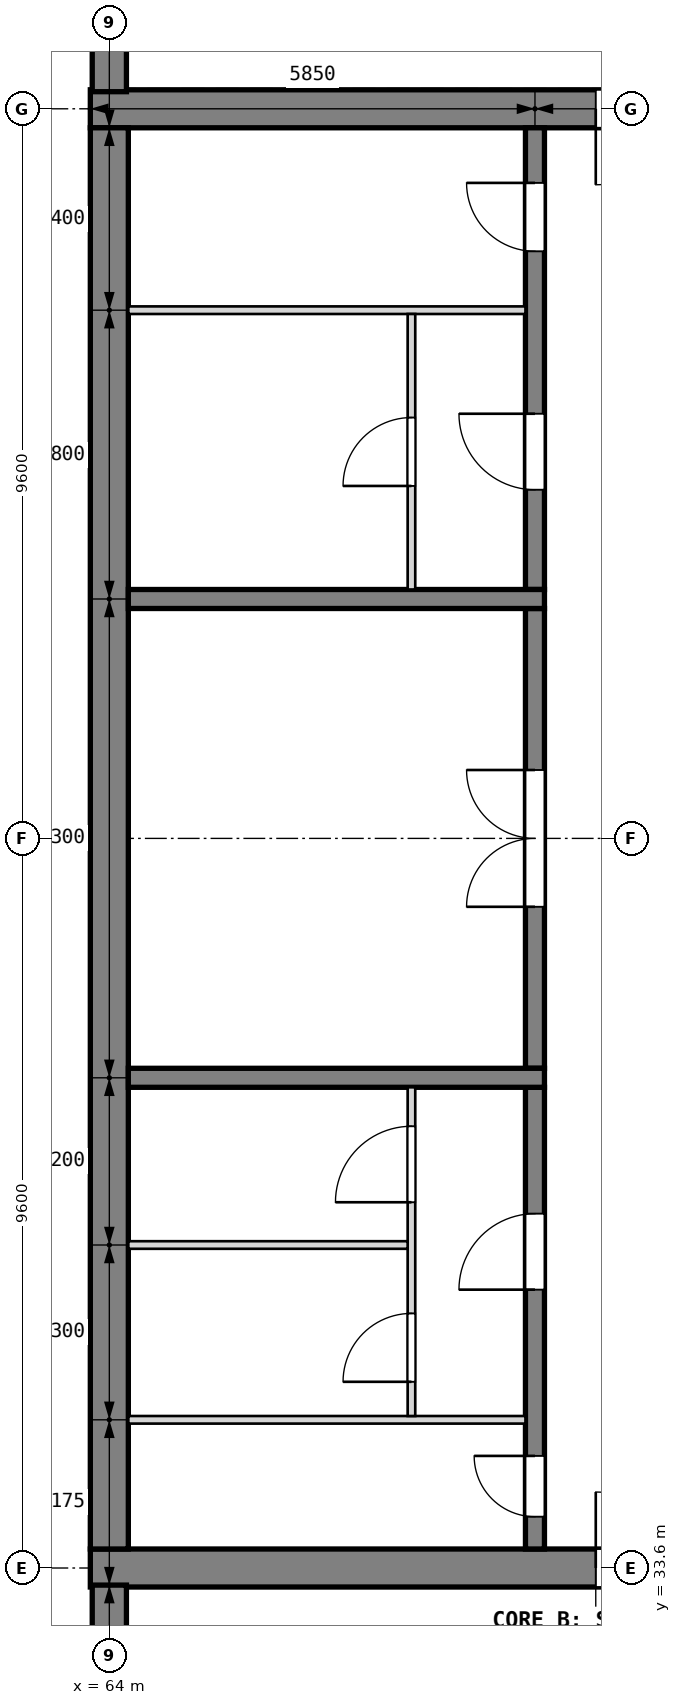
"""IFC4 building model, lengths in metres.
Left out: names, types, materials, properties, quantities, classifications, styles, units other than length and angle.
Written with IfcOpenShell. Run it as: python <this file> out.ifc"""

import sys

from ifc_helpers import new_model, si_unit, direction, frame, frame_2d, origin, place, context, subcontext, project, spatial, rectangle, extrude, element, fill, save


model = new_model("IFC4")
c1 = context("Model", 3, precision=1e-05, world=origin(), true_north=direction((0.0, 1.0)))
c2 = subcontext(c1, "Body", "Model", "MODEL_VIEW")
j1 = project(units=[si_unit("LENGTHUNIT", "METRE"), si_unit("PLANEANGLEUNIT", "RADIAN")], contexts=[c1])
p1 = place(None, origin())
s1 = spatial("IfcSite", under=j1, at=p1, CompositionType="ELEMENT")
p2 = place(p1, origin())
s2 = spatial("IfcBuilding", under=s1, at=p2, CompositionType="ELEMENT")
p3 = place(p2, frame((0.0, 0.0, -4.8)))
s3 = spatial("IfcBuildingStorey", under=s2, at=p3, CompositionType="ELEMENT", Elevation=-4.8)
p4 = place(p3, frame((63.75, 52.8, 0.0), z_axis=(0.0, 0.0, 1.0), x_axis=(1.0, 0.0, 0.0)))
e1 = element("IfcWall", 1, at=p4, inside=s3, PredefinedType="SHEAR", context=c2, shape_type="SweptSolid", body=[
    extrude(rectangle(XDim=13.3, YDim=0.5, at=frame_2d((6.65, 0.0))), origin(), (0.0, 0.0, 1.0), 4.8),
])
p5 = place(p4, frame((6.65, 0.0, 0.0)))
e2 = element("IfcOpeningElement", 2, at=p5, cuts=e1, PredefinedType="OPENING", context=c2, shape_type="SweptSolid", body=[
    extrude(rectangle(XDim=2.0, YDim=2.1, at=frame_2d((1.0, 1.05))), frame((0.0, 0.26, 0.0), z_axis=(0.0, -1.0, 0.0), x_axis=(1.0, 0.0, 0.0)), (0.0, 0.0, 1.0), 0.52),
])
p6 = place(p3, frame((63.75, 33.6, 0.0), z_axis=(0.0, 0.0, 1.0), x_axis=(1.0, 0.0, 0.0)))
e3 = element("IfcWall", 3, at=p6, inside=s3, PredefinedType="SHEAR", context=c2, shape_type="SweptSolid", body=[
    extrude(rectangle(XDim=13.3, YDim=0.5, at=frame_2d((6.65, 0.0))), origin(), (0.0, 0.0, 1.0), 4.8),
])
p7 = place(p6, frame((6.65, 0.0, 0.0)))
e4 = element("IfcOpeningElement", 4, at=p7, cuts=e3, PredefinedType="OPENING", context=c2, shape_type="SweptSolid", body=[
    extrude(rectangle(XDim=2.0, YDim=2.1, at=frame_2d((1.0, 1.05))), frame((0.0, 0.26, 0.0), z_axis=(0.0, -1.0, 0.0), x_axis=(1.0, 0.0, 0.0)), (0.0, 0.0, 1.0), 0.52),
])
p8 = place(p3, frame((64.0, 33.85, 0.0), z_axis=(0.0, 0.0, 1.0), x_axis=(0.0, 1.0, 0.0)))
e5 = element("IfcWall", 5, at=p8, inside=s3, PredefinedType="SHEAR", context=c2, shape_type="SweptSolid", body=[
    extrude(rectangle(XDim=18.7, YDim=0.5, at=frame_2d((9.35, 0.0))), origin(), (0.0, 0.0, 1.0), 4.8),
])
p9 = place(p3, frame((64.0, -0.225, 0.0), z_axis=(0.0, 0.0, 1.0), x_axis=(0.0, 1.0, 0.0)))
e6 = element("IfcWall", 6, at=p9, inside=s3, PredefinedType="SOLIDWALL", context=c2, shape_type="SweptSolid", body=[
    extrude(rectangle(XDim=33.6, YDim=0.45, at=frame_2d((16.8, 0.0))), origin(), (0.0, 0.0, 1.0), 4.8),
])
p10 = place(p3, frame((64.0, 53.025, 0.0), z_axis=(0.0, 0.0, 1.0), x_axis=(0.0, 1.0, 0.0)))
e7 = element("IfcWall", 7, at=p10, inside=s3, PredefinedType="SOLIDWALL", context=c2, shape_type="SweptSolid", body=[
    extrude(rectangle(XDim=4.8, YDim=0.45, at=frame_2d((2.4, 0.0))), origin(), (0.0, 0.0, 1.0), 4.8),
])
p11 = place(p3, frame((69.6, 33.85, 0.0), z_axis=(0.0, 0.0, 1.0), x_axis=(0.0, 1.0, 0.0)))
e8 = element("IfcWall", 8, at=p11, inside=s3, PredefinedType="SOLIDWALL", context=c2, shape_type="SweptSolid", body=[
    extrude(rectangle(XDim=6.075, YDim=0.25, at=frame_2d((3.038, 0.0))), origin(), (0.0, 0.0, 1.0), 4.5),
])
p12 = place(p11, frame((0.425, 0.0, 0.0)))
e9 = element("IfcOpeningElement", 9, at=p12, cuts=e8, PredefinedType="OPENING", context=c2, shape_type="SweptSolid", body=[
    extrude(rectangle(XDim=0.8, YDim=2.1, at=frame_2d((0.4, 1.05))), frame((0.0, 0.135, 0.0), z_axis=(0.0, -1.0, 0.0), x_axis=(1.0, 0.0, 0.0)), (0.0, 0.0, 1.0), 0.27),
])
p13 = place(p11, frame((3.413, 0.0, 0.0)))
e10 = element("IfcOpeningElement", 10, at=p13, cuts=e8, PredefinedType="OPENING", context=c2, shape_type="SweptSolid", body=[
    extrude(rectangle(XDim=1.0, YDim=2.1, at=frame_2d((0.5, 1.05))), frame((0.0, 0.135, 0.0), z_axis=(0.0, -1.0, 0.0), x_axis=(1.0, 0.0, 0.0)), (0.0, 0.0, 1.0), 0.27),
])
p14 = place(p3, frame((69.6, 40.175, 0.0), z_axis=(0.0, 0.0, 1.0), x_axis=(0.0, 1.0, 0.0)))
e11 = element("IfcWall", 11, at=p14, inside=s3, PredefinedType="SOLIDWALL", context=c2, shape_type="SweptSolid", body=[
    extrude(rectangle(XDim=6.05, YDim=0.25, at=frame_2d((3.025, 0.0))), origin(), (0.0, 0.0, 1.0), 4.5),
])
p15 = place(p14, frame((2.125, 0.0, 0.0)))
e12 = element("IfcOpeningElement", 12, at=p15, cuts=e11, PredefinedType="OPENING", context=c2, shape_type="SweptSolid", body=[
    extrude(rectangle(XDim=1.8, YDim=2.1, at=frame_2d((0.9, 1.05))), frame((0.0, 0.135, 0.0), z_axis=(0.0, -1.0, 0.0), x_axis=(1.0, 0.0, 0.0)), (0.0, 0.0, 1.0), 0.27),
])
p16 = place(p3, frame((69.6, 46.475, 0.0), z_axis=(0.0, 0.0, 1.0), x_axis=(0.0, 1.0, 0.0)))
e13 = element("IfcWall", 13, at=p16, inside=s3, PredefinedType="SOLIDWALL", context=c2, shape_type="SweptSolid", body=[
    extrude(rectangle(XDim=6.075, YDim=0.25, at=frame_2d((3.038, 0.0))), origin(), (0.0, 0.0, 1.0), 4.5),
])
p17 = place(p16, frame((1.312, 0.0, 0.0)))
e14 = element("IfcOpeningElement", 14, at=p17, cuts=e13, PredefinedType="OPENING", context=c2, shape_type="SweptSolid", body=[
    extrude(rectangle(XDim=1.0, YDim=2.1, at=frame_2d((0.5, 1.05))), frame((0.0, 0.135, 0.0), z_axis=(0.0, -1.0, 0.0), x_axis=(1.0, 0.0, 0.0)), (0.0, 0.0, 1.0), 0.27),
])
p18 = place(p16, frame((4.45, 0.0, 0.0)))
e15 = element("IfcOpeningElement", 15, at=p18, cuts=e13, PredefinedType="OPENING", context=c2, shape_type="SweptSolid", body=[
    extrude(rectangle(XDim=0.9, YDim=2.1, at=frame_2d((0.45, 1.05))), frame((0.0, 0.135, 0.0), z_axis=(0.0, -1.0, 0.0), x_axis=(1.0, 0.0, 0.0)), (0.0, 0.0, 1.0), 0.27),
])
for number, where, z_axis, x_axis in (
    (16, (69.725, 40.05, 0.0), (0.0, 0.0, 1.0), (-1.0, 0.0, 0.0)),
    (17, (69.725, 46.35, 0.0), (0.0, 0.0, 1.0), (-1.0, 0.0, 0.0)),
):
    element("IfcWall", number, at=place(p3, frame(where, z_axis=z_axis, x_axis=x_axis)), inside=s3, PredefinedType="SOLIDWALL", context=c2, shape_type="SweptSolid", body=[
        extrude(rectangle(XDim=5.475, YDim=0.25, at=frame_2d((2.738, 0.0))), origin(), (0.0, 0.0, 1.0), 4.5),
    ])
p19 = place(p3, frame((69.475, 35.55, 0.0), z_axis=(0.0, 0.0, 1.0), x_axis=(-1.0, 0.0, 0.0)))
e18 = element("IfcWall", 18, at=p19, inside=s3, PredefinedType="PARTITIONING", context=c2, shape_type="SweptSolid", body=[
    extrude(rectangle(XDim=5.225, YDim=0.1, at=frame_2d((2.613, 0.0))), origin(), (0.0, 0.0, 1.0), 4.5),
])
p20 = place(p3, frame((67.975, 35.6, 0.0), z_axis=(0.0, 0.0, 1.0), x_axis=(0.0, 1.0, 0.0)))
e19 = element("IfcWall", 19, at=p20, inside=s3, PredefinedType="PARTITIONING", context=c2, shape_type="SweptSolid", body=[
    extrude(rectangle(XDim=4.325, YDim=0.1, at=frame_2d((2.163, 0.0))), origin(), (0.0, 0.0, 1.0), 4.5),
])
p21 = place(p20, frame((0.45, 0.0, 0.0)))
e20 = element("IfcOpeningElement", 20, at=p21, cuts=e19, PredefinedType="OPENING", context=c2, shape_type="SweptSolid", body=[
    extrude(rectangle(XDim=0.9, YDim=2.1, at=frame_2d((0.45, 1.05))), frame((0.0, 0.06, 0.0), z_axis=(0.0, -1.0, 0.0), x_axis=(1.0, 0.0, 0.0)), (0.0, 0.0, 1.0), 0.12),
])
p22 = place(p20, frame((2.812, 0.0, 0.0)))
e21 = element("IfcOpeningElement", 21, at=p22, cuts=e19, PredefinedType="OPENING", context=c2, shape_type="SweptSolid", body=[
    extrude(rectangle(XDim=1.0, YDim=2.1, at=frame_2d((0.5, 1.05))), frame((0.0, 0.06, 0.0), z_axis=(0.0, -1.0, 0.0), x_axis=(1.0, 0.0, 0.0)), (0.0, 0.0, 1.0), 0.12),
])
p23 = place(p3, frame((67.925, 37.85, 0.0), z_axis=(0.0, 0.0, 1.0), x_axis=(-1.0, 0.0, 0.0)))
e22 = element("IfcWall", 22, at=p23, inside=s3, PredefinedType="PARTITIONING", context=c2, shape_type="SweptSolid", body=[
    extrude(rectangle(XDim=3.675, YDim=0.1, at=frame_2d((1.837, 0.0))), origin(), (0.0, 0.0, 1.0), 4.5),
])
p24 = place(p3, frame((69.475, 50.15, 0.0), z_axis=(0.0, 0.0, 1.0), x_axis=(-1.0, 0.0, 0.0)))
e23 = element("IfcWall", 23, at=p24, inside=s3, PredefinedType="PARTITIONING", context=c2, shape_type="SweptSolid", body=[
    extrude(rectangle(XDim=5.225, YDim=0.1, at=frame_2d((2.613, 0.0))), origin(), (0.0, 0.0, 1.0), 4.5),
])
p25 = place(p3, frame((67.975, 46.475, 0.0), z_axis=(0.0, 0.0, 1.0), x_axis=(0.0, 1.0, 0.0)))
e24 = element("IfcWall", 24, at=p25, inside=s3, PredefinedType="PARTITIONING", context=c2, shape_type="SweptSolid", body=[
    extrude(rectangle(XDim=3.625, YDim=0.1, at=frame_2d((1.812, 0.0))), origin(), (0.0, 0.0, 1.0), 4.5),
])
p26 = place(p25, frame((1.363, 0.0, 0.0)))
e25 = element("IfcOpeningElement", 25, at=p26, cuts=e24, PredefinedType="OPENING", context=c2, shape_type="SweptSolid", body=[
    extrude(rectangle(XDim=0.9, YDim=2.1, at=frame_2d((0.45, 1.05))), frame((0.0, 0.06, 0.0), z_axis=(0.0, -1.0, 0.0), x_axis=(1.0, 0.0, 0.0)), (0.0, 0.0, 1.0), 0.12),
])
p27 = place(p15, origin())
e26 = element("IfcDoor", 26, at=p27, inside=s3, OperationType="DOUBLE_DOOR_SINGLE_SWING", PredefinedType="DOOR", context=c2, shape_type="SweptSolid", body=[
    extrude(rectangle(XDim=1.8, YDim=2.1, at=frame_2d((0.9, 1.05))), frame((0.0, 0.025, 0.0), z_axis=(0.0, -1.0, 0.0), x_axis=(1.0, 0.0, 0.0)), (0.0, 0.0, 1.0), 0.05),
])
fill(e12, e26)
p28 = place(p12, origin())
e27 = element("IfcDoor", 27, at=p28, inside=s3, OperationType="SINGLE_SWING_RIGHT", PredefinedType="DOOR", context=c2, shape_type="SweptSolid", body=[
    extrude(rectangle(XDim=0.8, YDim=2.1, at=frame_2d((0.4, 1.05))), frame((0.0, 0.025, 0.0), z_axis=(0.0, -1.0, 0.0), x_axis=(1.0, 0.0, 0.0)), (0.0, 0.0, 1.0), 0.05),
])
fill(e9, e27)
p29 = place(p13, origin())
e28 = element("IfcDoor", 28, at=p29, inside=s3, OperationType="SINGLE_SWING_LEFT", PredefinedType="DOOR", context=c2, shape_type="SweptSolid", body=[
    extrude(rectangle(XDim=1.0, YDim=2.1, at=frame_2d((0.5, 1.05))), frame((0.0, 0.025, 0.0), z_axis=(0.0, -1.0, 0.0), x_axis=(1.0, 0.0, 0.0)), (0.0, 0.0, 1.0), 0.05),
])
fill(e10, e28)
p30 = place(p21, origin())
e29 = element("IfcDoor", 29, at=p30, inside=s3, OperationType="SINGLE_SWING_LEFT", PredefinedType="DOOR", context=c2, shape_type="SweptSolid", body=[
    extrude(rectangle(XDim=0.9, YDim=2.1, at=frame_2d((0.45, 1.05))), frame((0.0, 0.025, 0.0), z_axis=(0.0, -1.0, 0.0), x_axis=(1.0, 0.0, 0.0)), (0.0, 0.0, 1.0), 0.05),
])
fill(e20, e29)
p31 = place(p22, origin())
e30 = element("IfcDoor", 30, at=p31, inside=s3, OperationType="SINGLE_SWING_LEFT", PredefinedType="DOOR", context=c2, shape_type="SweptSolid", body=[
    extrude(rectangle(XDim=1.0, YDim=2.1, at=frame_2d((0.5, 1.05))), frame((0.0, 0.025, 0.0), z_axis=(0.0, -1.0, 0.0), x_axis=(1.0, 0.0, 0.0)), (0.0, 0.0, 1.0), 0.05),
])
fill(e21, e30)
p32 = place(p17, origin())
e31 = element("IfcDoor", 31, at=p32, inside=s3, OperationType="SINGLE_SWING_RIGHT", PredefinedType="DOOR", context=c2, shape_type="SweptSolid", body=[
    extrude(rectangle(XDim=1.0, YDim=2.1, at=frame_2d((0.5, 1.05))), frame((0.0, 0.025, 0.0), z_axis=(0.0, -1.0, 0.0), x_axis=(1.0, 0.0, 0.0)), (0.0, 0.0, 1.0), 0.05),
])
fill(e14, e31)
p33 = place(p26, origin())
e32 = element("IfcDoor", 32, at=p33, inside=s3, OperationType="SINGLE_SWING_LEFT", PredefinedType="DOOR", context=c2, shape_type="SweptSolid", body=[
    extrude(rectangle(XDim=0.9, YDim=2.1, at=frame_2d((0.45, 1.05))), frame((0.0, 0.025, 0.0), z_axis=(0.0, -1.0, 0.0), x_axis=(1.0, 0.0, 0.0)), (0.0, 0.0, 1.0), 0.05),
])
fill(e25, e32)
p34 = place(p18, origin())
e33 = element("IfcDoor", 33, at=p34, inside=s3, OperationType="SINGLE_SWING_RIGHT", PredefinedType="DOOR", context=c2, shape_type="SweptSolid", body=[
    extrude(rectangle(XDim=0.9, YDim=2.1, at=frame_2d((0.45, 1.05))), frame((0.0, 0.025, 0.0), z_axis=(0.0, -1.0, 0.0), x_axis=(1.0, 0.0, 0.0)), (0.0, 0.0, 1.0), 0.05),
])
fill(e15, e33)
p35 = place(p7, origin())
e34 = element("IfcDoor", 34, at=p35, inside=s3, OperationType="DOUBLE_DOOR_SINGLE_SWING", PredefinedType="DOOR", context=c2, shape_type="SweptSolid", body=[
    extrude(rectangle(XDim=2.0, YDim=2.1, at=frame_2d((1.0, 1.05))), frame((0.0, 0.025, 0.0), z_axis=(0.0, -1.0, 0.0), x_axis=(1.0, 0.0, 0.0)), (0.0, 0.0, 1.0), 0.05),
])
fill(e4, e34)
p36 = place(p5, frame((2.0, 0.0, 0.0), z_axis=(0.0, 0.0, 1.0), x_axis=(-1.0, 0.0, 0.0)))
e35 = element("IfcDoor", 35, at=p36, inside=s3, OperationType="DOUBLE_DOOR_SINGLE_SWING", PredefinedType="DOOR", context=c2, shape_type="SweptSolid", body=[
    extrude(rectangle(XDim=2.0, YDim=2.1, at=frame_2d((1.0, 1.05))), frame((0.0, 0.025, 0.0), z_axis=(0.0, -1.0, 0.0), x_axis=(1.0, 0.0, 0.0)), (0.0, 0.0, 1.0), 0.05),
])
fill(e2, e35)
save(model, sys.argv[1])
